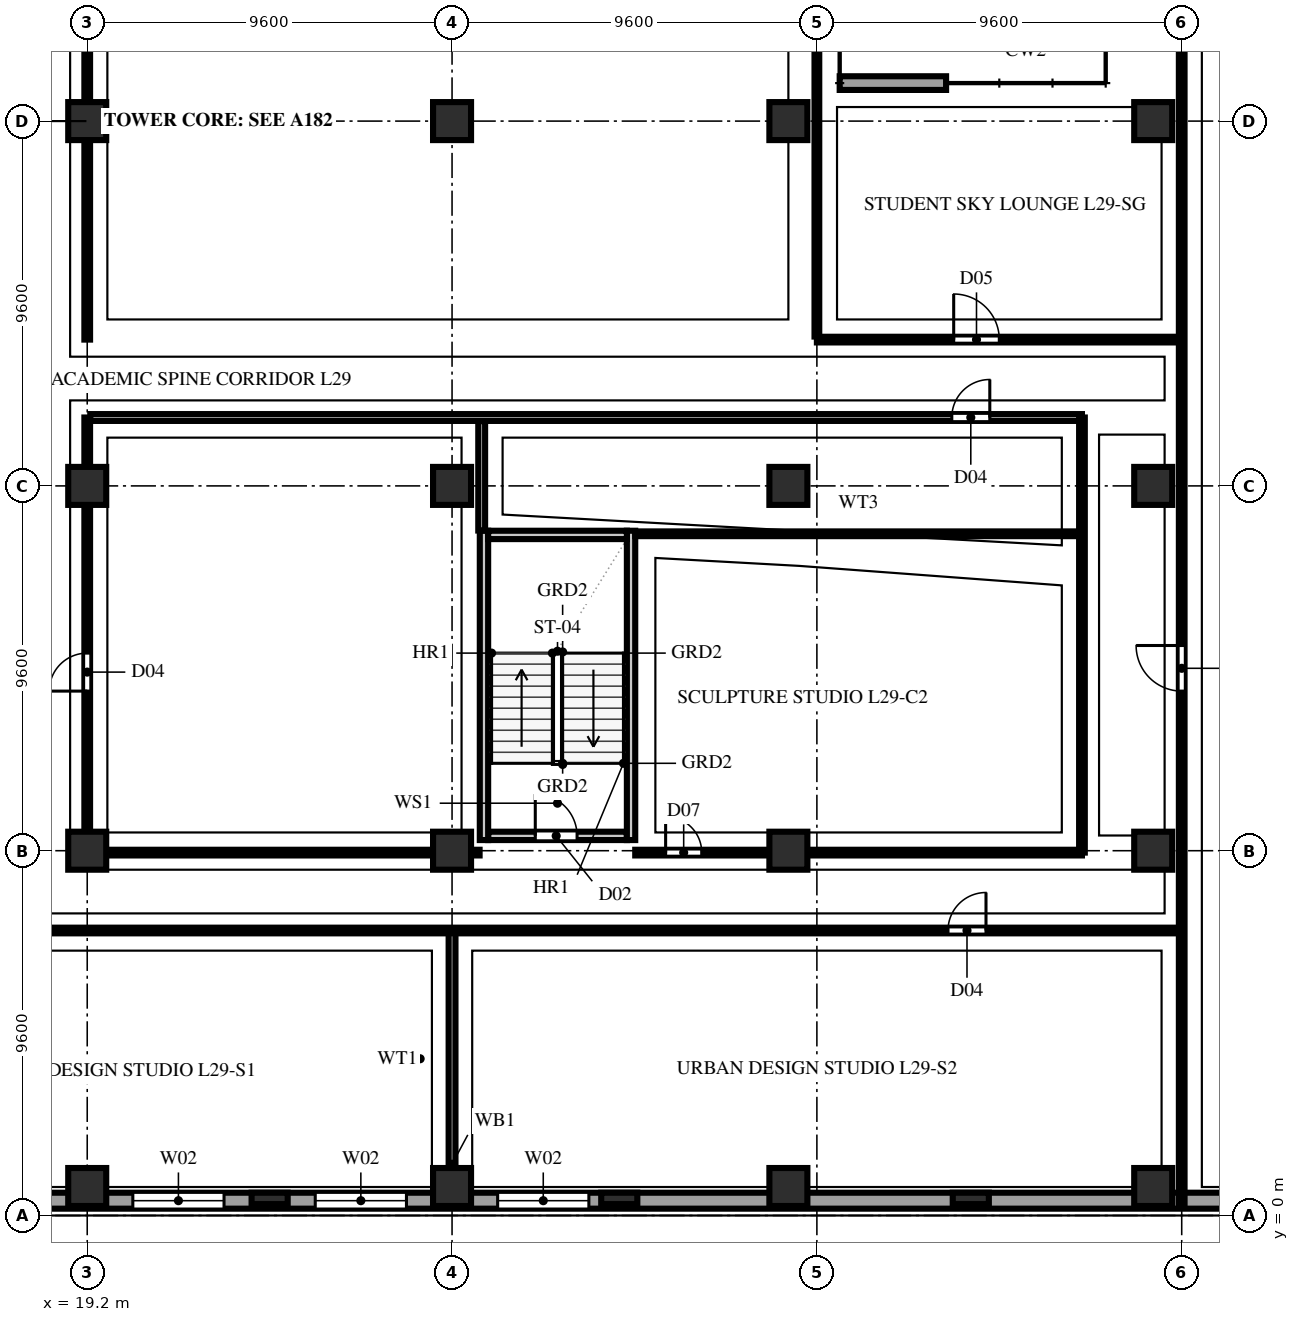
"""IFC4 building model, lengths in metres.
Left out: names, types, materials, properties, quantities, classifications, styles, units other than length and angle.
Written with IfcOpenShell. Run it as: python <this file> out.ifc"""

import sys

from ifc_helpers import new_model, si_unit, direction, frame, frame_2d, origin, origin_2d, place, context, subcontext, project, spatial, rectangle, extrude, element, fill, save


model = new_model("IFC4")
c1 = context("Model", 3, precision=1e-05, world=origin(), true_north=direction((0.0, 1.0)))
c2 = subcontext(c1, "Body", "Model", "MODEL_VIEW")
j1 = project(units=[si_unit("LENGTHUNIT", "METRE"), si_unit("PLANEANGLEUNIT", "RADIAN")], contexts=[c1])
p1 = place(None, origin())
s1 = spatial("IfcSite", under=j1, at=p1, CompositionType="ELEMENT")
p2 = place(p1, origin())
s2 = spatial("IfcBuilding", under=s1, at=p2, CompositionType="ELEMENT")
p3 = place(p2, frame((0.0, 0.0, 116.6)))
s3 = spatial("IfcBuildingStorey", under=s2, at=p3, CompositionType="ELEMENT", Elevation=116.6)
for number, where, z_axis, x_axis in (
    (1, (19.2, 0.75, 0.0), (0.0, 0.0, 1.0), (1.0, 0.0, 0.0)),
    (2, (19.2, 9.6, 0.0), (0.0, 0.0, 1.0), (1.0, 0.0, 0.0)),
    (3, (19.2, 19.2, 0.0), (0.0, 0.0, 1.0), (1.0, 0.0, 0.0)),
    (4, (19.2, 28.8, 0.0), (0.0, 0.0, 1.0), (1.0, 0.0, 0.0)),
    (5, (28.8, 0.75, 0.0), (0.0, 0.0, 1.0), (1.0, 0.0, 0.0)),
    (6, (28.8, 9.6, 0.0), (0.0, 0.0, 1.0), (1.0, 0.0, 0.0)),
    (7, (28.8, 19.2, 0.0), (0.0, 0.0, 1.0), (1.0, 0.0, 0.0)),
    (8, (28.8, 28.8, 0.0), (0.0, 0.0, 1.0), (1.0, 0.0, 0.0)),
    (9, (37.65, 0.75, 0.0), (0.0, 0.0, 1.0), (1.0, 0.0, 0.0)),
    (10, (37.65, 9.6, 0.0), (0.0, 0.0, 1.0), (1.0, 0.0, 0.0)),
    (11, (37.65, 19.2, 0.0), (0.0, 0.0, 1.0), (1.0, 0.0, 0.0)),
    (12, (37.65, 28.8, 0.0), (0.0, 0.0, 1.0), (1.0, 0.0, 0.0)),
    (13, (47.25, 0.75, 0.0), (0.0, 0.0, 1.0), (1.0, 0.0, 0.0)),
    (14, (47.25, 9.6, 0.0), (0.0, 0.0, 1.0), (1.0, 0.0, 0.0)),
    (15, (47.25, 19.2, 0.0), (0.0, 0.0, 1.0), (1.0, 0.0, 0.0)),
    (16, (47.25, 28.8, 0.0), (0.0, 0.0, 1.0), (1.0, 0.0, 0.0)),
):
    element("IfcColumn", number, at=place(p3, frame(where, z_axis=z_axis, x_axis=x_axis)), inside=s3, PredefinedType="COLUMN", context=c2, shape_type="SweptSolid", body=[
        extrude(rectangle(XDim=1.0, YDim=1.0, at=origin_2d()), origin(), (0.0, 0.0, 1.0), 3.8),
    ])
for number, where, z_axis, x_axis in (
    (17, (24.0, 0.45, 0.0), (0.0, 0.0, 1.0), (1.0, 0.0, 0.0)),
    (18, (33.2, 0.45, 0.0), (0.0, 0.0, 1.0), (1.0, 0.0, 0.0)),
    (19, (42.45, 0.45, 0.0), (0.0, 0.0, 1.0), (1.0, 0.0, 0.0)),
):
    element("IfcColumn", number, at=place(p3, frame(where, z_axis=z_axis, x_axis=x_axis)), inside=s3, PredefinedType="PILASTER", context=c2, shape_type="SweptSolid", body=[
        extrude(rectangle(XDim=0.95, YDim=0.3, at=origin_2d()), origin(), (0.0, 0.0, 1.0), 3.8),
    ])
p4 = place(p3, frame((1.84, 0.39, 0.0), z_axis=(0.0, 0.0, 1.0), x_axis=(1.0, 0.0, 0.0)))
e20 = element("IfcWall", 20, at=p4, inside=s3, PredefinedType="SOLIDWALL", context=c2, shape_type="SweptSolid", body=[
    extrude(rectangle(XDim=53.92, YDim=0.42, at=frame_2d((26.96, 0.0))), origin(), (0.0, 0.0, 1.0), 3.54),
])
p5 = place(p4, frame((4.16, 0.0, 0.85)))
e21 = element("IfcOpeningElement", 21, at=p5, cuts=e20, PredefinedType="OPENING", context=c2, shape_type="SweptSolid", body=[
    extrude(rectangle(XDim=2.4, YDim=1.85, at=frame_2d((1.2, 0.925))), frame((0.0, 0.222, 0.0), z_axis=(0.0, -1.0, 0.0), x_axis=(1.0, 0.0, 0.0)), (0.0, 0.0, 1.0), 0.444),
])
p6 = place(p4, frame((8.96, 0.0, 0.85)))
e22 = element("IfcOpeningElement", 22, at=p6, cuts=e20, PredefinedType="OPENING", context=c2, shape_type="SweptSolid", body=[
    extrude(rectangle(XDim=2.4, YDim=1.85, at=frame_2d((1.2, 0.925))), frame((0.0, 0.222, 0.0), z_axis=(0.0, -1.0, 0.0), x_axis=(1.0, 0.0, 0.0)), (0.0, 0.0, 1.0), 0.444),
])
p7 = place(p4, frame((13.76, 0.0, 0.85)))
e23 = element("IfcOpeningElement", 23, at=p7, cuts=e20, PredefinedType="OPENING", context=c2, shape_type="SweptSolid", body=[
    extrude(rectangle(XDim=2.4, YDim=1.85, at=frame_2d((1.2, 0.925))), frame((0.0, 0.222, 0.0), z_axis=(0.0, -1.0, 0.0), x_axis=(1.0, 0.0, 0.0)), (0.0, 0.0, 1.0), 0.444),
])
p8 = place(p4, frame((18.56, 0.0, 0.85)))
e24 = element("IfcOpeningElement", 24, at=p8, cuts=e20, PredefinedType="OPENING", context=c2, shape_type="SweptSolid", body=[
    extrude(rectangle(XDim=2.4, YDim=1.85, at=frame_2d((1.2, 0.925))), frame((0.0, 0.222, 0.0), z_axis=(0.0, -1.0, 0.0), x_axis=(1.0, 0.0, 0.0)), (0.0, 0.0, 1.0), 0.444),
])
p9 = place(p4, frame((23.36, 0.0, 0.85)))
e25 = element("IfcOpeningElement", 25, at=p9, cuts=e20, PredefinedType="OPENING", context=c2, shape_type="SweptSolid", body=[
    extrude(rectangle(XDim=2.4, YDim=1.85, at=frame_2d((1.2, 0.925))), frame((0.0, 0.222, 0.0), z_axis=(0.0, -1.0, 0.0), x_axis=(1.0, 0.0, 0.0)), (0.0, 0.0, 1.0), 0.444),
])
p10 = place(p4, frame((28.16, 0.0, 0.85)))
e26 = element("IfcOpeningElement", 26, at=p10, cuts=e20, PredefinedType="OPENING", context=c2, shape_type="SweptSolid", body=[
    extrude(rectangle(XDim=2.4, YDim=1.85, at=frame_2d((1.2, 0.925))), frame((0.0, 0.222, 0.0), z_axis=(0.0, -1.0, 0.0), x_axis=(1.0, 0.0, 0.0)), (0.0, 0.0, 1.0), 0.444),
])
p11 = place(p3, frame((39.0, 29.8, 0.0), z_axis=(0.0, 0.0, 1.0), x_axis=(1.0, 0.0, 0.0)))
e27 = element("IfcWall", 27, at=p11, inside=s3, PredefinedType="SOLIDWALL", context=c2, shape_type="SweptSolid", body=[
    extrude(rectangle(XDim=2.8, YDim=0.36, at=frame_2d((1.4, 0.0))), origin(), (0.0, 0.0, 1.0), 3.54),
])
p12 = place(p3, frame((29.75, 9.99, 0.0), z_axis=(0.0, 0.0, 1.0), x_axis=(1.0, 0.0, 0.0)))
e28 = element("IfcWall", 28, at=p12, inside=s3, PredefinedType="SOLIDWALL", context=c2, shape_type="SweptSolid", body=[
    extrude(rectangle(XDim=3.65, YDim=0.22, at=frame_2d((1.825, 0.0))), origin(), (0.0, 0.0, 1.0), 3.54),
])
p13 = place(p12, frame((1.24, 0.0, 0.0)))
e29 = element("IfcOpeningElement", 29, at=p13, cuts=e28, PredefinedType="OPENING", context=c2, shape_type="SweptSolid", body=[
    extrude(rectangle(XDim=1.1, YDim=2.2, at=frame_2d((0.55, 1.1))), frame((0.0, 0.122, 0.0), z_axis=(0.0, -1.0, 0.0), x_axis=(1.0, 0.0, 0.0)), (0.0, 0.0, 1.0), 0.244),
])
for number, where, z_axis, x_axis in (
    (30, (29.64, 9.88, 0.0), (0.0, 0.0, 1.0), (0.0, 1.0, 0.0)),
    (31, (33.51, 9.88, 0.0), (0.0, 0.0, 1.0), (0.0, 1.0, 0.0)),
):
    element("IfcWall", number, at=place(p3, frame(where, z_axis=z_axis, x_axis=x_axis)), inside=s3, PredefinedType="SOLIDWALL", context=c2, shape_type="SweptSolid", body=[
        extrude(rectangle(XDim=8.14, YDim=0.22, at=frame_2d((4.07, 0.0))), origin(), (0.0, 0.0, 1.0), 3.54),
    ])
p14 = place(p3, frame((29.75, 17.91, 0.0), z_axis=(0.0, 0.0, 1.0), x_axis=(1.0, 0.0, 0.0)))
e32 = element("IfcWall", 32, at=p14, inside=s3, PredefinedType="SOLIDWALL", context=c2, shape_type="SweptSolid", body=[
    extrude(rectangle(XDim=3.65, YDim=0.22, at=frame_2d((1.825, 0.0))), origin(), (0.0, 0.0, 1.0), 3.54),
])
p15 = place(p3, frame((28.8, 0.22, 0.0), z_axis=(0.0, 0.0, 1.0), x_axis=(0.0, 1.0, 0.0)))
e33 = element("IfcWall", 33, at=p15, inside=s3, PredefinedType="PARTITIONING", context=c2, shape_type="SweptSolid", body=[
    extrude(rectangle(XDim=0.53, YDim=0.18, at=frame_2d((0.265, 0.0))), origin(), (0.0, 0.0, 1.0), 3.54),
])
p16 = place(p3, frame((28.8, 0.75, 0.0), z_axis=(0.0, 0.0, 1.0), x_axis=(0.0, 1.0, 0.0)))
e34 = element("IfcWall", 34, at=p16, inside=s3, PredefinedType="PARTITIONING", context=c2, shape_type="SweptSolid", body=[
    extrude(rectangle(XDim=6.75, YDim=0.18, at=frame_2d((3.375, 0.0))), origin(), (0.0, 0.0, 1.0), 2.923),
])
p17 = place(p3, frame((0.22, 7.5, 0.0), z_axis=(0.0, 0.0, 1.0), x_axis=(1.0, 0.0, 0.0)))
e35 = element("IfcWall", 35, at=p17, inside=s3, PredefinedType="PARTITIONING", context=c2, shape_type="SweptSolid", body=[
    extrude(rectangle(XDim=47.78, YDim=0.15, at=frame_2d((23.89, 0.0))), origin(), (0.0, 0.0, 1.0), 3.54),
])
p18 = place(p17, frame((13.68, 0.0, 0.0)))
e36 = element("IfcOpeningElement", 36, at=p18, cuts=e35, PredefinedType="OPENING", context=c2, shape_type="SweptSolid", body=[
    extrude(rectangle(XDim=1.0, YDim=2.2, at=frame_2d((0.5, 1.1))), frame((0.0, 0.087, 0.0), z_axis=(0.0, -1.0, 0.0), x_axis=(1.0, 0.0, 0.0)), (0.0, 0.0, 1.0), 0.174),
])
p19 = place(p17, frame((41.63, 0.0, 0.0)))
e37 = element("IfcOpeningElement", 37, at=p19, cuts=e35, PredefinedType="OPENING", context=c2, shape_type="SweptSolid", body=[
    extrude(rectangle(XDim=1.0, YDim=2.2, at=frame_2d((0.5, 1.1))), frame((0.0, 0.087, 0.0), z_axis=(0.0, -1.0, 0.0), x_axis=(1.0, 0.0, 0.0)), (0.0, 0.0, 1.0), 0.174),
])
p20 = place(p3, frame((48.0, 0.22, 0.0), z_axis=(0.0, 0.0, 1.0), x_axis=(0.0, 1.0, 0.0)))
e38 = element("IfcWall", 38, at=p20, inside=s3, PredefinedType="PARTITIONING", context=c2, shape_type="SweptSolid", body=[
    extrude(rectangle(XDim=37.96, YDim=0.15, at=frame_2d((18.98, 0.0))), origin(), (0.0, 0.0, 1.0), 3.54),
])
p21 = place(p20, frame((13.58, 0.0, 0.0)))
e39 = element("IfcOpeningElement", 39, at=p21, cuts=e38, PredefinedType="OPENING", context=c2, shape_type="SweptSolid", body=[
    extrude(rectangle(XDim=1.2, YDim=2.2, at=frame_2d((0.6, 1.1))), frame((0.0, 0.087, 0.0), z_axis=(0.0, -1.0, 0.0), x_axis=(1.0, 0.0, 0.0)), (0.0, 0.0, 1.0), 0.174),
])
p22 = place(p3, frame((19.2, 9.55, 0.0), z_axis=(0.0, 0.0, 1.0), x_axis=(0.0, 1.0, 0.0)))
e40 = element("IfcWall", 40, at=p22, inside=s3, PredefinedType="PARTITIONING", context=c2, shape_type="SweptSolid", body=[
    extrude(rectangle(XDim=11.45, YDim=0.15, at=frame_2d((5.725, 0.0))), origin(), (0.0, 0.0, 1.0), 2.923),
])
p23 = place(p22, frame((4.25, 0.0, 0.0)))
e41 = element("IfcOpeningElement", 41, at=p23, cuts=e40, PredefinedType="OPENING", context=c2, shape_type="SweptSolid", body=[
    extrude(rectangle(XDim=1.0, YDim=2.2, at=frame_2d((0.5, 1.1))), frame((0.0, 0.087, 0.0), z_axis=(0.0, -1.0, 0.0), x_axis=(1.0, 0.0, 0.0)), (0.0, 0.0, 1.0), 0.174),
])
p24 = place(p3, frame((29.58, 18.025, 0.0), z_axis=(0.0, 0.0, 1.0), x_axis=(0.0, 1.0, 0.0)))
e42 = element("IfcWall", 42, at=p24, inside=s3, PredefinedType="PARTITIONING", context=c2, shape_type="SweptSolid", body=[
    extrude(rectangle(XDim=2.88, YDim=0.18, at=frame_2d((1.44, 0.0))), origin(), (0.0, 0.0, 1.0), 3.54),
])
p25 = place(p3, frame((19.28, 21.0, 0.0), z_axis=(0.0, 0.0, 1.0), x_axis=(1.0, 0.0, 0.0)))
e43 = element("IfcWall", 43, at=p25, inside=s3, PredefinedType="PARTITIONING", context=c2, shape_type="SweptSolid", body=[
    extrude(rectangle(XDim=26.095, YDim=0.18, at=frame_2d((13.047, 0.0))), origin(), (0.0, 0.0, 1.0), 3.54),
])
p26 = place(p25, frame((22.67, 0.0, 0.0)))
e44 = element("IfcOpeningElement", 44, at=p26, cuts=e43, PredefinedType="OPENING", context=c2, shape_type="SweptSolid", body=[
    extrude(rectangle(XDim=1.0, YDim=2.2, at=frame_2d((0.5, 1.1))), frame((0.0, 0.102, 0.0), z_axis=(0.0, -1.0, 0.0), x_axis=(1.0, 0.0, 0.0)), (0.0, 0.0, 1.0), 0.204),
])
p27 = place(p3, frame((19.28, 9.55, 0.0), z_axis=(0.0, 0.0, 1.0), x_axis=(1.0, 0.0, 0.0)))
e45 = element("IfcWall", 45, at=p27, inside=s3, PredefinedType="PARTITIONING", context=c2, shape_type="SweptSolid", body=[
    extrude(rectangle(XDim=10.245, YDim=0.15, at=frame_2d((5.123, 0.0))), origin(), (0.0, 0.0, 1.0), 2.923),
])
p28 = place(p3, frame((33.62, 17.94, 0.0), z_axis=(0.0, 0.0, 1.0), x_axis=(1.0, 0.0, 0.0)))
e46 = element("IfcWall", 46, at=p28, inside=s3, PredefinedType="PARTITIONING", context=c2, shape_type="SweptSolid", body=[
    extrude(rectangle(XDim=11.755, YDim=0.125, at=frame_2d((5.877, 0.0))), origin(), (0.0, 0.0, 1.0), 3.54),
])
p29 = place(p3, frame((33.62, 9.55, 0.0), z_axis=(0.0, 0.0, 1.0), x_axis=(1.0, 0.0, 0.0)))
e47 = element("IfcWall", 47, at=p29, inside=s3, PredefinedType="PARTITIONING", context=c2, shape_type="SweptSolid", body=[
    extrude(rectangle(XDim=11.755, YDim=0.15, at=frame_2d((5.877, 0.0))), origin(), (0.0, 0.0, 1.0), 2.923),
])
p30 = place(p29, frame((0.8, 0.0, 0.0)))
e48 = element("IfcOpeningElement", 48, at=p30, cuts=e47, PredefinedType="OPENING", context=c2, shape_type="SweptSolid", body=[
    extrude(rectangle(XDim=0.95, YDim=2.15, at=frame_2d((0.475, 1.075))), frame((0.0, 0.087, 0.0), z_axis=(0.0, -1.0, 0.0), x_axis=(1.0, 0.0, 0.0)), (0.0, 0.0, 1.0), 0.174),
])
p31 = place(p3, frame((45.375, 9.55, 0.0), z_axis=(0.0, 0.0, 1.0), x_axis=(0.0, 1.0, 0.0)))
e49 = element("IfcWall", 49, at=p31, inside=s3, PredefinedType="PARTITIONING", context=c2, shape_type="SweptSolid", body=[
    extrude(rectangle(XDim=11.45, YDim=0.15, at=frame_2d((5.725, 0.0))), origin(), (0.0, 0.0, 1.0), 3.54),
])
p32 = place(p3, frame((38.4, 23.05, 0.0), z_axis=(0.0, 0.0, 1.0), x_axis=(1.0, 0.0, 0.0)))
e50 = element("IfcWall", 50, at=p32, inside=s3, PredefinedType="PARTITIONING", context=c2, shape_type="SweptSolid", body=[
    extrude(rectangle(XDim=9.52, YDim=0.15, at=frame_2d((4.76, 0.0))), origin(), (0.0, 0.0, 1.0), 3.54),
])
p33 = place(p32, frame((3.6, 0.0, 0.0)))
e51 = element("IfcOpeningElement", 51, at=p33, cuts=e50, PredefinedType="OPENING", context=c2, shape_type="SweptSolid", body=[
    extrude(rectangle(XDim=1.2, YDim=2.2, at=frame_2d((0.6, 1.1))), frame((0.0, 0.087, 0.0), z_axis=(0.0, -1.0, 0.0), x_axis=(1.0, 0.0, 0.0)), (0.0, 0.0, 1.0), 0.174),
])
p34 = place(p3, frame((38.4, 23.13, 0.0), z_axis=(0.0, 0.0, 1.0), x_axis=(0.0, 1.0, 0.0)))
e52 = element("IfcWall", 52, at=p34, inside=s3, PredefinedType="PARTITIONING", context=c2, shape_type="SweptSolid", body=[
    extrude(rectangle(XDim=14.66, YDim=0.125, at=frame_2d((7.33, 0.0))), origin(), (0.0, 0.0, 1.0), 3.54),
])
p35 = place(p3, frame((19.2, 23.05, 0.0), z_axis=(0.0, 0.0, 1.0), x_axis=(0.0, 1.0, 0.0)))
e53 = element("IfcWall", 53, at=p35, inside=s3, PredefinedType="PARTITIONING", context=c2, shape_type="SweptSolid", body=[
    extrude(rectangle(XDim=43.4, YDim=0.15, at=frame_2d((21.7, 0.0))), origin(), (0.0, 0.0, 1.0), 2.923),
])
p36 = place(p35, frame((19.0, 0.0, 0.0)))
e54 = element("IfcOpeningElement", 54, at=p36, cuts=e53, PredefinedType="OPENING", context=c2, shape_type="SweptSolid", body=[
    extrude(rectangle(XDim=1.0, YDim=2.2, at=frame_2d((0.5, 1.1))), frame((0.0, 0.087, 0.0), z_axis=(0.0, -1.0, 0.0), x_axis=(1.0, 0.0, 0.0)), (0.0, 0.0, 1.0), 0.174),
])
p37 = place(p8, origin())
e55 = element("IfcWindow", 55, at=p37, inside=s3, PartitioningType="TRIPLE_PANEL_VERTICAL", PredefinedType="WINDOW", context=c2, shape_type="SweptSolid", body=[
    extrude(rectangle(XDim=2.4, YDim=1.85, at=frame_2d((1.2, 0.925))), frame((0.0, 0.11, 0.0), z_axis=(0.0, -1.0, 0.0), x_axis=(1.0, 0.0, 0.0)), (0.0, 0.0, 1.0), 0.06),
])
fill(e24, e55)
p38 = place(p9, origin())
e56 = element("IfcWindow", 56, at=p38, inside=s3, PartitioningType="TRIPLE_PANEL_VERTICAL", PredefinedType="WINDOW", context=c2, shape_type="SweptSolid", body=[
    extrude(rectangle(XDim=2.4, YDim=1.85, at=frame_2d((1.2, 0.925))), frame((0.0, 0.11, 0.0), z_axis=(0.0, -1.0, 0.0), x_axis=(1.0, 0.0, 0.0)), (0.0, 0.0, 1.0), 0.06),
])
fill(e25, e56)
p39 = place(p10, origin())
e57 = element("IfcWindow", 57, at=p39, inside=s3, PartitioningType="TRIPLE_PANEL_VERTICAL", PredefinedType="WINDOW", context=c2, shape_type="SweptSolid", body=[
    extrude(rectangle(XDim=2.4, YDim=1.85, at=frame_2d((1.2, 0.925))), frame((0.0, 0.11, 0.0), z_axis=(0.0, -1.0, 0.0), x_axis=(1.0, 0.0, 0.0)), (0.0, 0.0, 1.0), 0.06),
])
fill(e26, e57)
p40 = place(p13, origin())
e58 = element("IfcDoor", 58, at=p40, inside=s3, OperationType="SINGLE_SWING_LEFT", PredefinedType="DOOR", context=c2, shape_type="SweptSolid", body=[
    extrude(rectangle(XDim=1.1, YDim=2.2, at=frame_2d((0.55, 1.1))), frame((0.0, 0.025, 0.0), z_axis=(0.0, -1.0, 0.0), x_axis=(1.0, 0.0, 0.0)), (0.0, 0.0, 1.0), 0.05),
])
fill(e29, e58)
p41 = place(p19, origin())
e59 = element("IfcDoor", 59, at=p41, inside=s3, OperationType="SINGLE_SWING_RIGHT", PredefinedType="DOOR", context=c2, shape_type="SweptSolid", body=[
    extrude(rectangle(XDim=1.0, YDim=2.2, at=frame_2d((0.5, 1.1))), frame((0.0, 0.025, 0.0), z_axis=(0.0, -1.0, 0.0), x_axis=(1.0, 0.0, 0.0)), (0.0, 0.0, 1.0), 0.05),
])
fill(e37, e59)
p42 = place(p21, origin())
e60 = element("IfcDoor", 60, at=p42, inside=s3, OperationType="SINGLE_SWING_RIGHT", PredefinedType="DOOR", context=c2, shape_type="SweptSolid", body=[
    extrude(rectangle(XDim=1.2, YDim=2.2, at=frame_2d((0.6, 1.1))), frame((0.0, 0.025, 0.0), z_axis=(0.0, -1.0, 0.0), x_axis=(1.0, 0.0, 0.0)), (0.0, 0.0, 1.0), 0.05),
])
fill(e39, e60)
p43 = place(p23, origin())
e61 = element("IfcDoor", 61, at=p43, inside=s3, OperationType="SINGLE_SWING_LEFT", PredefinedType="DOOR", context=c2, shape_type="SweptSolid", body=[
    extrude(rectangle(XDim=1.0, YDim=2.2, at=frame_2d((0.5, 1.1))), frame((0.0, 0.025, 0.0), z_axis=(0.0, -1.0, 0.0), x_axis=(1.0, 0.0, 0.0)), (0.0, 0.0, 1.0), 0.05),
])
fill(e41, e61)
p44 = place(p26, origin())
e62 = element("IfcDoor", 62, at=p44, inside=s3, OperationType="SINGLE_SWING_RIGHT", PredefinedType="DOOR", context=c2, shape_type="SweptSolid", body=[
    extrude(rectangle(XDim=1.0, YDim=2.2, at=frame_2d((0.5, 1.1))), frame((0.0, 0.025, 0.0), z_axis=(0.0, -1.0, 0.0), x_axis=(1.0, 0.0, 0.0)), (0.0, 0.0, 1.0), 0.05),
])
fill(e44, e62)
p45 = place(p30, origin())
e63 = element("IfcDoor", 63, at=p45, inside=s3, OperationType="SINGLE_SWING_LEFT", PredefinedType="DOOR", context=c2, shape_type="SweptSolid", body=[
    extrude(rectangle(XDim=0.95, YDim=2.15, at=frame_2d((0.475, 1.075))), frame((0.0, 0.025, 0.0), z_axis=(0.0, -1.0, 0.0), x_axis=(1.0, 0.0, 0.0)), (0.0, 0.0, 1.0), 0.05),
])
fill(e48, e63)
p46 = place(p33, origin())
e64 = element("IfcDoor", 64, at=p46, inside=s3, OperationType="SINGLE_SWING_LEFT", PredefinedType="DOOR", context=c2, shape_type="SweptSolid", body=[
    extrude(rectangle(XDim=1.2, YDim=2.2, at=frame_2d((0.6, 1.1))), frame((0.0, 0.025, 0.0), z_axis=(0.0, -1.0, 0.0), x_axis=(1.0, 0.0, 0.0)), (0.0, 0.0, 1.0), 0.05),
])
fill(e51, e64)
save(model, sys.argv[1])
